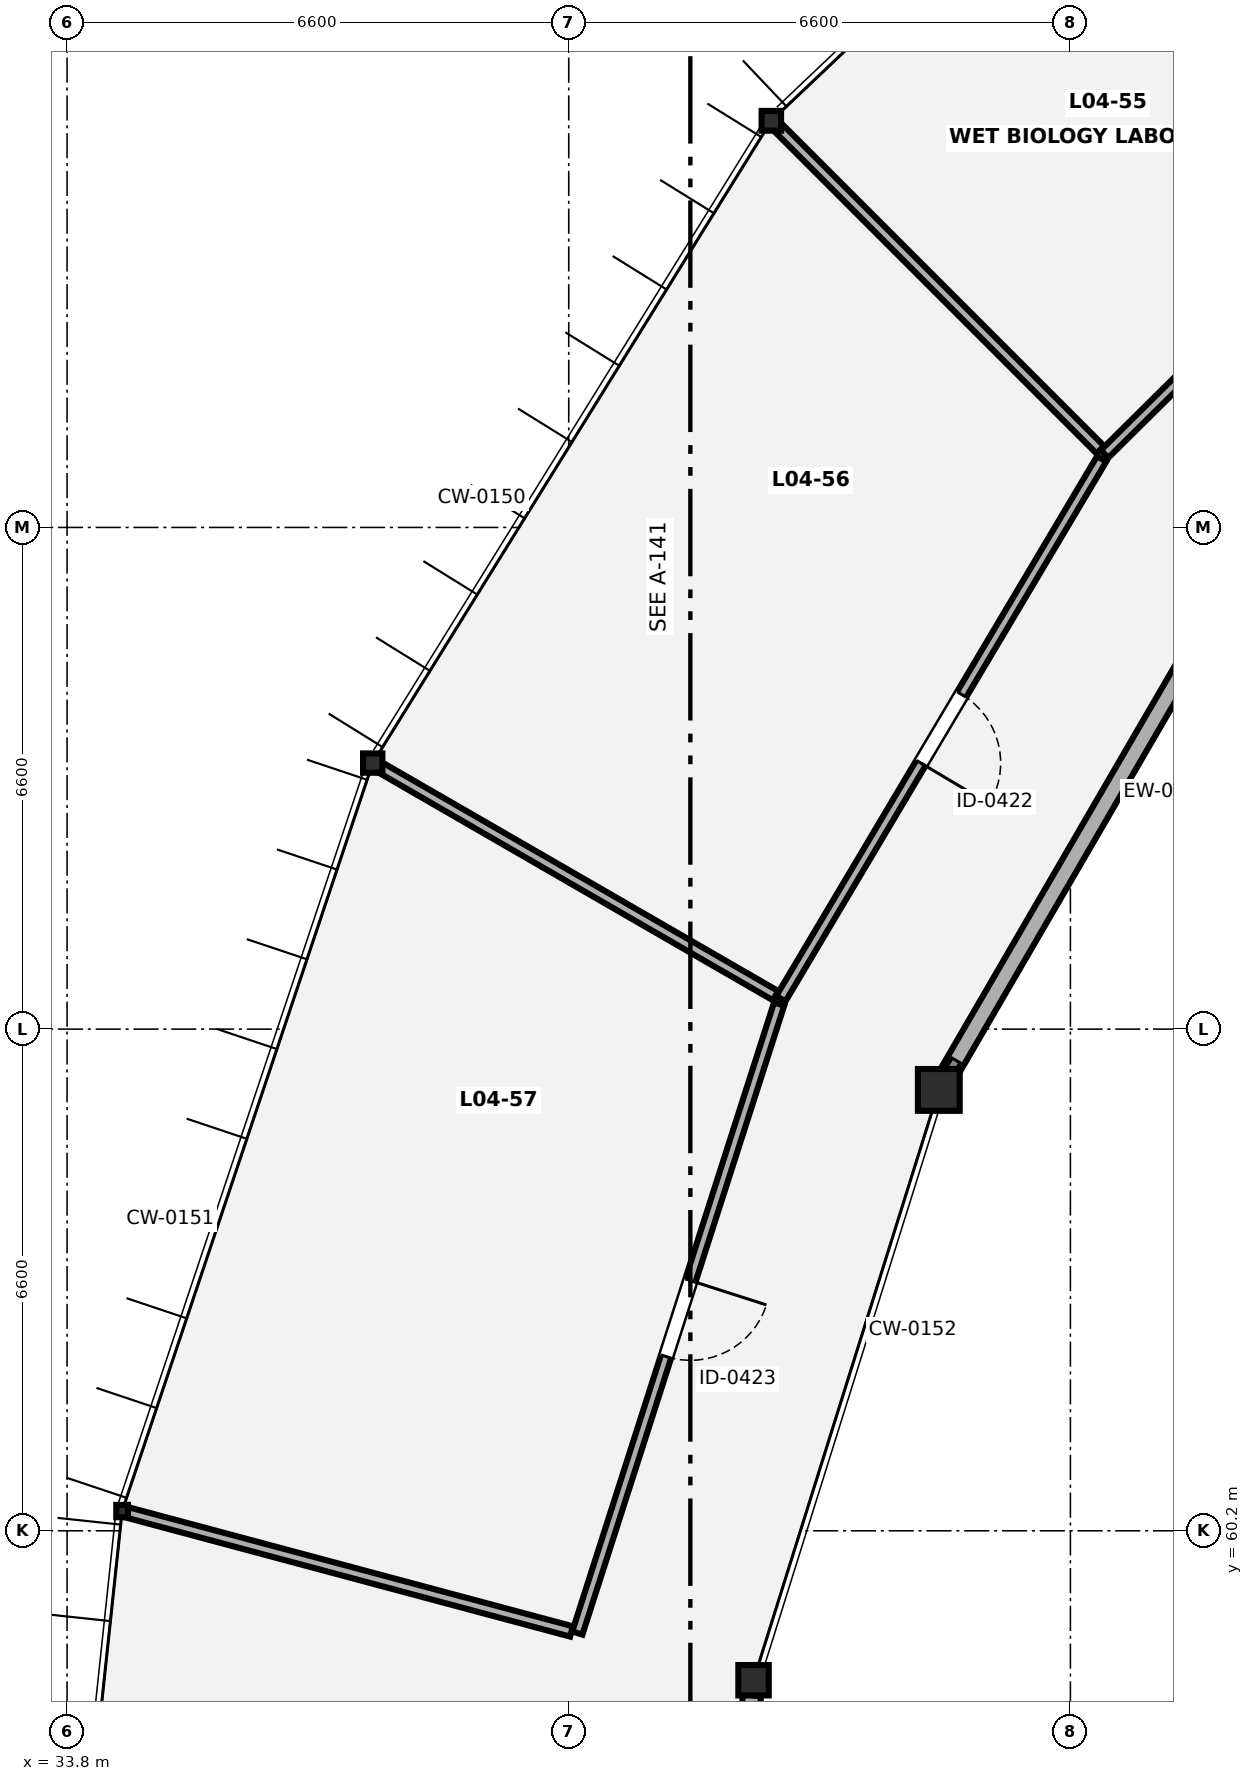
"""IFC4 building model, lengths in metres.
Left out: names, types, materials, properties, quantities, classifications, styles, units other than length and angle.
Written with IfcOpenShell. Run it as: python <this file> out.ifc"""

import sys

from ifc_helpers import new_model, si_unit, direction, frame, frame_2d, origin, origin_2d, place, context, subcontext, project, spatial, rectangle, i_section, extrude, element, fill, save


model = new_model("IFC4")
c1 = context("Model", 3, precision=1e-05, world=origin(), true_north=direction((0.0, 1.0)))
c2 = subcontext(c1, "Body", "Model", "MODEL_VIEW")
j1 = project(units=[si_unit("LENGTHUNIT", "METRE"), si_unit("PLANEANGLEUNIT", "RADIAN")], contexts=[c1])
p1 = place(None, origin())
s1 = spatial("IfcSite", under=j1, at=p1, CompositionType="ELEMENT")
p2 = place(p1, origin())
s2 = spatial("IfcBuilding", under=s1, at=p2, CompositionType="ELEMENT")
p3 = place(p2, frame((0.0, 0.0, 17.5)))
s3 = spatial("IfcBuildingStorey", under=s2, at=p3, CompositionType="ELEMENT", Elevation=17.5)
p4 = place(p3, frame((43.065, 78.75, 0.0), z_axis=(0.0, 0.0, 1.0), x_axis=(1.0, 0.0, 0.0)))
e1 = element("IfcColumn", 1, at=p4, inside=s3, PredefinedType="COLUMN", context=c2, shape_type="SweptSolid", body=[
    extrude(i_section(OverallWidth=0.256, OverallDepth=0.26, WebThickness=0.01, FlangeThickness=0.017, FilletRadius=0.014, at=origin_2d()), origin(), (0.0, 0.0, 1.0), 4.2),
])
p5 = place(p3, frame((37.821, 70.3, 0.0), z_axis=(0.0, 0.0, 1.0), x_axis=(1.0, 0.0, 0.0)))
e2 = element("IfcColumn", 2, at=p5, inside=s3, PredefinedType="COLUMN", context=c2, shape_type="SweptSolid", body=[
    extrude(i_section(OverallWidth=0.254, OverallDepth=0.254, WebThickness=0.009, FlangeThickness=0.014, FilletRadius=0.014, at=origin_2d()), origin(), (0.0, 0.0, 1.0), 4.2),
])
p6 = place(p3, frame((45.269, 66.0, 0.0), z_axis=(0.0, 0.0, 1.0), x_axis=(1.0, 0.0, 0.0)))
e3 = element("IfcColumn", 3, at=p6, inside=s3, PredefinedType="COLUMN", context=c2, shape_type="SweptSolid", body=[
    extrude(rectangle(XDim=0.55, YDim=0.55, at=origin_2d()), origin(), (0.0, 0.0, 1.0), 4.2),
])
p7 = place(p3, frame((34.524, 60.46, 0.0), z_axis=(0.0, 0.0, 1.0), x_axis=(1.0, 0.0, 0.0)))
e4 = element("IfcColumn", 4, at=p7, inside=s3, PredefinedType="COLUMN", context=c2, shape_type="SweptSolid", body=[
    extrude(i_section(OverallWidth=0.154, OverallDepth=0.162, WebThickness=0.008, FlangeThickness=0.011, FilletRadius=0.009, at=origin_2d()), origin(), (0.0, 0.0, 1.0), 4.2),
])
p8 = place(p3, frame((42.831, 58.234, 0.0), z_axis=(0.0, 0.0, 1.0), x_axis=(1.0, 0.0, 0.0)))
e5 = element("IfcColumn", 5, at=p8, inside=s3, PredefinedType="PILASTER", context=c2, shape_type="SweptSolid", body=[
    extrude(rectangle(XDim=0.4, YDim=0.4, at=origin_2d()), origin(), (0.0, 0.0, 1.0), 4.2),
])
p9 = place(p3, frame((49.086, 72.565, 0.0), z_axis=(0.0, 0.0, 1.0), x_axis=(-0.502637947221, -0.864497017932, 0.0)))
e6 = element("IfcWall", 6, at=p9, inside=s3, PredefinedType="SOLIDWALL", context=c2, shape_type="SweptSolid", body=[
    extrude(rectangle(XDim=7.279, YDim=0.24, at=frame_2d((3.639, 0.0))), origin(), (0.0, 0.0, 1.0), 3.65),
])
p10 = place(p3, frame((42.812, 58.036, 0.0), z_axis=(0.0, 0.0, 1.0), x_axis=(-0.099255190182, -0.995062011747, 0.0)))
e7 = element("IfcWall", 7, at=p10, inside=s3, PredefinedType="SOLIDWALL", context=c2, shape_type="SweptSolid", body=[
    extrude(rectangle(XDim=8.073, YDim=0.24, at=frame_2d((4.036, 0.0))), origin(), (0.0, 0.0, 1.0), 3.65),
])
p11 = place(p10, frame((3.311, 0.0, 0.85)))
e8 = element("IfcOpeningElement", 8, at=p11, cuts=e7, PredefinedType="OPENING", context=c2, shape_type="SweptSolid", body=[
    extrude(rectangle(XDim=1.45, YDim=1.25, at=frame_2d((0.725, 0.625))), frame((0.0, 0.13, 0.0), z_axis=(0.0, -1.0, 0.0), x_axis=(1.0, 0.0, 0.0)), (0.0, 0.0, 1.0), 0.26),
])
p12 = place(p3, frame((52.999, 79.863, 0.0), z_axis=(0.0, 0.0, 1.0), x_axis=(-0.710427757183, -0.703770134222, 0.0)))
e9 = element("IfcWall", 9, at=p12, inside=s3, PredefinedType="PARTITIONING", context=c2, shape_type="SweptSolid", body=[
    extrude(rectangle(XDim=7.811, YDim=0.14, at=frame_2d((3.905, 0.0))), origin(), (0.0, 0.0, 1.0), 4.0),
])
p13 = place(p3, frame((47.393, 74.423, 0.0), z_axis=(0.0, 0.0, 1.0), x_axis=(-0.707106781187, 0.707106781187, 0.0)))
e10 = element("IfcWall", 10, at=p13, inside=s3, PredefinedType="PARTITIONING", context=c2, shape_type="SweptSolid", body=[
    extrude(rectangle(XDim=6.06, YDim=0.14, at=frame_2d((3.03, 0.0))), origin(), (0.0, 0.0, 1.0), 3.323),
])
p14 = place(p3, frame((47.412, 74.302, 0.0), z_axis=(0.0, 0.0, 1.0), x_axis=(-0.51092787214, -0.85962358592, 0.0)))
e11 = element("IfcWall", 11, at=p14, inside=s3, PredefinedType="PARTITIONING", context=c2, shape_type="SweptSolid", body=[
    extrude(rectangle(XDim=8.262, YDim=0.14, at=frame_2d((4.131, 0.0))), origin(), (0.0, 0.0, 1.0), 4.0),
])
p15 = place(p14, frame((3.606, 0.0, 0.0)))
e12 = element("IfcOpeningElement", 12, at=p15, cuts=e11, PredefinedType="OPENING", context=c2, shape_type="SweptSolid", body=[
    extrude(rectangle(XDim=1.05, YDim=2.15, at=frame_2d((0.525, 1.075))), frame((0.0, 0.08, 0.0), z_axis=(0.0, -1.0, 0.0), x_axis=(1.0, 0.0, 0.0)), (0.0, 0.0, 1.0), 0.16),
])
p16 = place(p3, frame((43.121, 67.24, 0.0), z_axis=(0.0, 0.0, 1.0), x_axis=(-0.866010470582, 0.500025864173, 0.0)))
e13 = element("IfcWall", 13, at=p16, inside=s3, PredefinedType="PARTITIONING", context=c2, shape_type="SweptSolid", body=[
    extrude(rectangle(XDim=6.06, YDim=0.14, at=frame_2d((3.03, 0.0))), origin(), (0.0, 0.0, 1.0), 3.471),
])
p17 = place(p3, frame((43.168, 67.13, 0.0), z_axis=(0.0, 0.0, 1.0), x_axis=(-0.305487150125, -0.952196198852, 0.0)))
e14 = element("IfcWall", 14, at=p17, inside=s3, PredefinedType="PARTITIONING", context=c2, shape_type="SweptSolid", body=[
    extrude(rectangle(XDim=8.69, YDim=0.14, at=frame_2d((4.345, 0.0))), origin(), (0.0, 0.0, 1.0), 4.0),
])
p18 = place(p17, frame((3.82, 0.0, 0.0)))
e15 = element("IfcOpeningElement", 15, at=p18, cuts=e14, PredefinedType="OPENING", context=c2, shape_type="SweptSolid", body=[
    extrude(rectangle(XDim=1.05, YDim=2.15, at=frame_2d((0.525, 1.075))), frame((0.0, 0.08, 0.0), z_axis=(0.0, -1.0, 0.0), x_axis=(1.0, 0.0, 0.0)), (0.0, 0.0, 1.0), 0.16),
])
p19 = place(p3, frame((40.436, 58.876, 0.0), z_axis=(0.0, 0.0, 1.0), x_axis=(-0.965916578341, 0.258853556448, 0.0)))
e16 = element("IfcWall", 16, at=p19, inside=s3, PredefinedType="PARTITIONING", context=c2, shape_type="SweptSolid", body=[
    extrude(rectangle(XDim=6.06, YDim=0.14, at=frame_2d((3.03, 0.0))), origin(), (0.0, 0.0, 1.0), 3.465),
])
p20 = place(p15, origin())
e17 = element("IfcDoor", 17, at=p20, inside=s3, OperationType="SINGLE_SWING_RIGHT", PredefinedType="DOOR", context=c2, shape_type="SweptSolid", body=[
    extrude(rectangle(XDim=1.05, YDim=2.15, at=frame_2d((0.525, 1.075))), frame((0.0, 0.025, 0.0), z_axis=(0.0, -1.0, 0.0), x_axis=(1.0, 0.0, 0.0)), (0.0, 0.0, 1.0), 0.05),
])
fill(e12, e17)
p21 = place(p18, origin())
e18 = element("IfcDoor", 18, at=p21, inside=s3, OperationType="SINGLE_SWING_LEFT", PredefinedType="DOOR", context=c2, shape_type="SweptSolid", body=[
    extrude(rectangle(XDim=1.05, YDim=2.15, at=frame_2d((0.525, 1.075))), frame((0.0, 0.025, 0.0), z_axis=(0.0, -1.0, 0.0), x_axis=(1.0, 0.0, 0.0)), (0.0, 0.0, 1.0), 0.05),
])
fill(e15, e18)
save(model, sys.argv[1])
